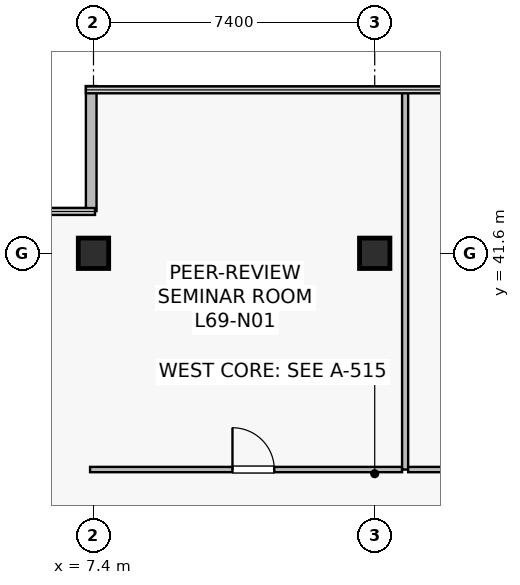
"""IFC4 building model, lengths in metres.
Left out: names, types, materials, properties, quantities, classifications, styles, units other than length and angle.
Written with IfcOpenShell. Run it as: python <this file> out.ifc"""

import sys

from ifc_helpers import new_model, si_unit, direction, frame, frame_2d, origin, origin_2d, place, context, subcontext, project, spatial, rectangle, extrude, source, transform, mapped, element, fill, save


model = new_model("IFC4")
c1 = context("Model", 3, precision=1e-05, world=origin(), true_north=direction((0.0, 1.0)))
c2 = subcontext(c1, "Body", "Model", "MODEL_VIEW")
j1 = project(units=[si_unit("LENGTHUNIT", "METRE"), si_unit("PLANEANGLEUNIT", "RADIAN")], contexts=[c1])
p1 = place(None, origin())
s1 = spatial("IfcSite", under=j1, at=p1, CompositionType="ELEMENT")
p2 = place(p1, origin())
s2 = spatial("IfcBuilding", under=s1, at=p2, CompositionType="ELEMENT")
p3 = place(p2, frame((0.0, 0.0, 287.5)))
s3 = spatial("IfcBuildingStorey", under=s2, at=p3, CompositionType="ELEMENT", Elevation=287.5)
m1 = source(origin(), c2, "Body", "SweptSolid", [
    extrude(rectangle(XDim=0.8, YDim=0.8, at=origin_2d()), origin(), (0.0, 0.0, 1.0), 4.1),
])
for number, where, z_axis, x_axis in (
    (1, (14.8, 41.6, 0.0), (0.0, 0.0, 1.0), (1.0, 0.0, 0.0)),
    (2, (7.4, 41.6, 0.0), (0.0, 0.0, 1.0), (1.0, 0.0, 0.0)),
):
    element("IfcColumn", number, at=place(p3, frame(where, z_axis=z_axis, x_axis=x_axis)), inside=s3, PredefinedType="COLUMN", context=c2, shape_type="MappedRepresentation", body=[
        mapped(m1, transform((0.0, 0.0, 0.0), scale=1.0)),
    ])
p4 = place(p3, frame((7.34, 46.0, 0.0), z_axis=(0.0, 0.0, 1.0), x_axis=(0.0, -1.0, 0.0)))
e3 = element("IfcWall", 3, at=p4, inside=s3, PredefinedType="STANDARD", context=c2, shape_type="SweptSolid", body=[
    extrude(rectangle(XDim=3.288, YDim=0.28, at=frame_2d((1.644, 0.0))), origin(), (0.0, 0.0, 1.0), 3.8),
])
p5 = place(p3, frame((7.31, 35.91, 0.0), z_axis=(0.0, 0.0, 1.0), x_axis=(1.0, 0.0, 0.0)))
e4 = element("IfcWall", 4, at=p5, inside=s3, PredefinedType="PARTITIONING", context=c2, shape_type="SweptSolid", body=[
    extrude(rectangle(XDim=8.21, YDim=0.14, at=frame_2d((4.105, 0.0))), origin(), (0.0, 0.0, 1.0), 3.197),
])
p6 = place(p5, frame((3.747, 0.0, 0.0)))
e5 = element("IfcOpeningElement", 5, at=p6, cuts=e4, PredefinedType="OPENING", context=c2, shape_type="SweptSolid", body=[
    extrude(rectangle(XDim=1.1, YDim=2.18, at=frame_2d((0.55, 1.09))), frame((0.0, 0.08, 0.0), z_axis=(0.0, -1.0, 0.0), x_axis=(1.0, 0.0, 0.0)), (0.0, 0.0, 1.0), 0.16),
])
p7 = place(p3, frame((15.6, 35.91, 0.0), z_axis=(0.0, 0.0, 1.0), x_axis=(0.0, 1.0, 0.0)))
e6 = element("IfcWall", 6, at=p7, inside=s3, PredefinedType="PARTITIONING", context=c2, shape_type="SweptSolid", body=[
    extrude(rectangle(XDim=9.98, YDim=0.16, at=frame_2d((4.99, 0.0))), origin(), (0.0, 0.0, 1.0), 3.135),
])
p8 = place(p3, frame((15.68, 35.91, 0.0), z_axis=(0.0, 0.0, 1.0), x_axis=(1.0, 0.0, 0.0)))
e7 = element("IfcWall", 7, at=p8, inside=s3, PredefinedType="PARTITIONING", context=c2, shape_type="SweptSolid", body=[
    extrude(rectangle(XDim=13.44, YDim=0.14, at=frame_2d((6.72, 0.0))), origin(), (0.0, 0.0, 1.0), 3.197),
])
p9 = place(p8, frame((5.122, 0.0, 0.0)))
e8 = element("IfcOpeningElement", 8, at=p9, cuts=e7, PredefinedType="OPENING", context=c2, shape_type="SweptSolid", body=[
    extrude(rectangle(XDim=1.1, YDim=2.18, at=frame_2d((0.55, 1.09))), frame((0.0, 0.08, 0.0), z_axis=(0.0, -1.0, 0.0), x_axis=(1.0, 0.0, 0.0)), (0.0, 0.0, 1.0), 0.16),
])
m2 = source(origin(), c2, "Body", "SweptSolid", [
    extrude(rectangle(XDim=1.1, YDim=2.18, at=frame_2d((0.55, 1.09))), frame((0.0, 0.025, 0.0), z_axis=(0.0, -1.0, 0.0), x_axis=(1.0, 0.0, 0.0)), (0.0, 0.0, 1.0), 0.05),
])
p10 = place(p6, origin())
e9 = element("IfcDoor", 9, at=p10, inside=s3, OperationType="SINGLE_SWING_LEFT", PredefinedType="DOOR", context=c2, shape_type="MappedRepresentation", body=[
    mapped(m2, transform((0.0, 0.0, 0.0), scale=1.0)),
])
fill(e5, e9)
save(model, sys.argv[1])
